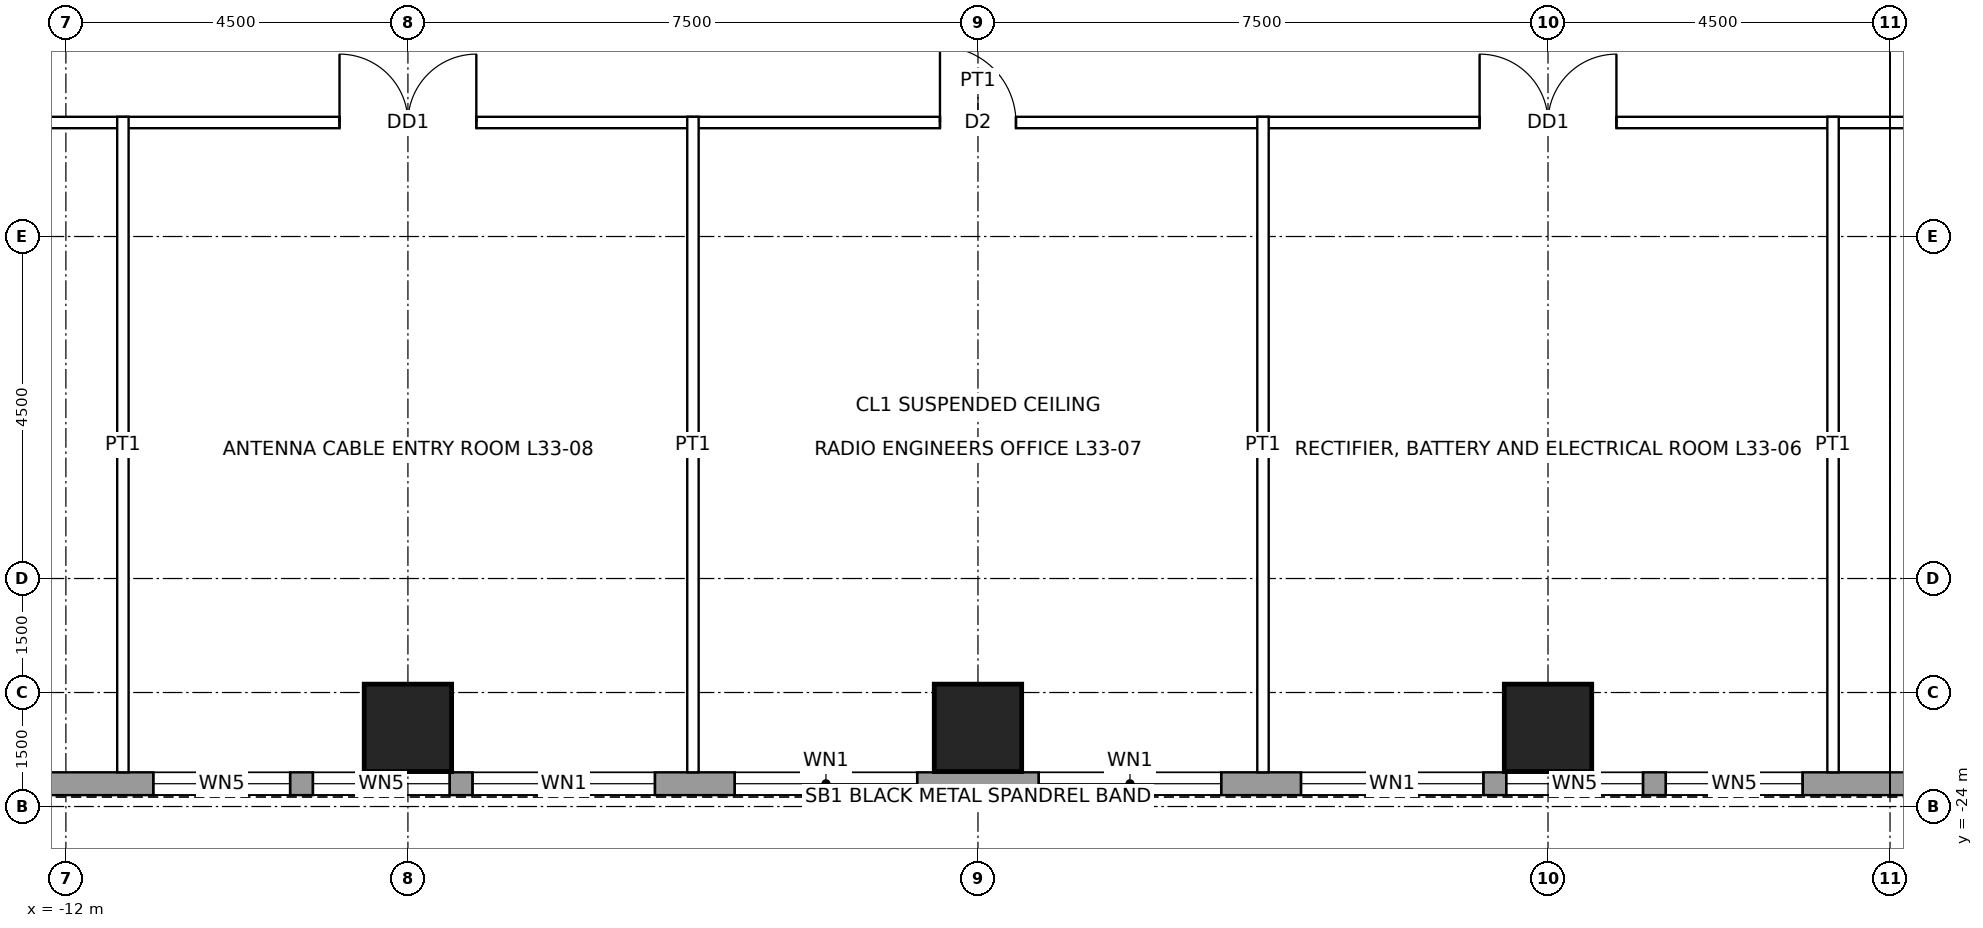
"""IFC4 building model, lengths in metres.
Left out: names, types, materials, properties, quantities, classifications, styles, units other than length and angle.
Written with IfcOpenShell. Run it as: python <this file> out.ifc"""

import sys

from ifc_helpers import new_model, si_unit, direction, frame, frame_2d, origin, origin_2d, place, context, subcontext, project, spatial, rectangle, hollow_rectangle, extrude, element, fill, save


model = new_model("IFC4")
c1 = context("Model", 3, precision=1e-05, world=origin(), true_north=direction((0.0, 1.0)))
c2 = subcontext(c1, "Body", "Model", "MODEL_VIEW")
j1 = project(units=[si_unit("LENGTHUNIT", "METRE"), si_unit("PLANEANGLEUNIT", "RADIAN")], contexts=[c1])
p1 = place(None, origin())
s1 = spatial("IfcSite", under=j1, at=p1, CompositionType="ELEMENT")
p2 = place(p1, origin())
s2 = spatial("IfcBuilding", under=s1, at=p2, CompositionType="ELEMENT")
p3 = place(p2, frame((0.0, 0.0, 162.9)))
s3 = spatial("IfcBuildingStorey", under=s2, at=p3, CompositionType="ELEMENT", Elevation=162.9)
for number, where, z_axis, x_axis in (
    (1, (7.5, -22.965, 0.0), (0.0, 0.0, 1.0), (1.0, 0.0, 0.0)),
    (2, (0.0, -22.965, 0.0), (0.0, 0.0, 1.0), (1.0, 0.0, 0.0)),
    (3, (-7.5, -22.965, 0.0), (0.0, 0.0, 1.0), (1.0, 0.0, 0.0)),
):
    element("IfcColumn", number, at=place(p3, frame(where, z_axis=z_axis, x_axis=x_axis)), inside=s3, PredefinedType="COLUMN", context=c2, shape_type="SweptSolid", body=[
        extrude(hollow_rectangle(XDim=1.15, YDim=1.15, WallThickness=0.075, at=origin_2d()), origin(), (0.0, 0.0, 1.0), 4.5),
    ])
p4 = place(p3, frame((16.2, -23.7, 0.0), z_axis=(0.0, 0.0, 1.0), x_axis=(-1.0, 0.0, 0.0)))
e4 = element("IfcWall", 4, at=p4, inside=s3, PredefinedType="SOLIDWALL", context=c2, shape_type="SweptSolid", body=[
    extrude(rectangle(XDim=32.4, YDim=0.3, at=frame_2d((16.2, 0.0))), origin(), (0.0, 0.0, 1.0), 4.3),
])
p5 = place(p4, frame((5.35, 0.0, 1.0)))
e5 = element("IfcOpeningElement", 5, at=p5, cuts=e4, PredefinedType="OPENING", context=c2, shape_type="SweptSolid", body=[
    extrude(rectangle(XDim=1.8, YDim=1.2, at=frame_2d((0.9, 0.6))), frame((0.0, 0.16, 0.0), z_axis=(0.0, -1.0, 0.0), x_axis=(1.0, 0.0, 0.0)), (0.0, 0.0, 1.0), 0.32),
])
p6 = place(p4, frame((7.45, 0.0, 1.0)))
e6 = element("IfcOpeningElement", 6, at=p6, cuts=e4, PredefinedType="OPENING", context=c2, shape_type="SweptSolid", body=[
    extrude(rectangle(XDim=1.8, YDim=1.2, at=frame_2d((0.9, 0.6))), frame((0.0, 0.16, 0.0), z_axis=(0.0, -1.0, 0.0), x_axis=(1.0, 0.0, 0.0)), (0.0, 0.0, 1.0), 0.32),
])
p7 = place(p4, frame((9.55, 0.0, 1.0)))
e7 = element("IfcOpeningElement", 7, at=p7, cuts=e4, PredefinedType="OPENING", context=c2, shape_type="SweptSolid", body=[
    extrude(rectangle(XDim=2.4, YDim=1.2, at=frame_2d((1.2, 0.6))), frame((0.0, 0.16, 0.0), z_axis=(0.0, -1.0, 0.0), x_axis=(1.0, 0.0, 0.0)), (0.0, 0.0, 1.0), 0.32),
])
p8 = place(p4, frame((13.0, 0.0, 1.0)))
e8 = element("IfcOpeningElement", 8, at=p8, cuts=e4, PredefinedType="OPENING", context=c2, shape_type="SweptSolid", body=[
    extrude(rectangle(XDim=2.4, YDim=1.2, at=frame_2d((1.2, 0.6))), frame((0.0, 0.16, 0.0), z_axis=(0.0, -1.0, 0.0), x_axis=(1.0, 0.0, 0.0)), (0.0, 0.0, 1.0), 0.32),
])
p9 = place(p4, frame((17.0, 0.0, 1.0)))
e9 = element("IfcOpeningElement", 9, at=p9, cuts=e4, PredefinedType="OPENING", context=c2, shape_type="SweptSolid", body=[
    extrude(rectangle(XDim=2.4, YDim=1.2, at=frame_2d((1.2, 0.6))), frame((0.0, 0.16, 0.0), z_axis=(0.0, -1.0, 0.0), x_axis=(1.0, 0.0, 0.0)), (0.0, 0.0, 1.0), 0.32),
])
p10 = place(p4, frame((20.45, 0.0, 1.0)))
e10 = element("IfcOpeningElement", 10, at=p10, cuts=e4, PredefinedType="OPENING", context=c2, shape_type="SweptSolid", body=[
    extrude(rectangle(XDim=2.4, YDim=1.2, at=frame_2d((1.2, 0.6))), frame((0.0, 0.16, 0.0), z_axis=(0.0, -1.0, 0.0), x_axis=(1.0, 0.0, 0.0)), (0.0, 0.0, 1.0), 0.32),
])
p11 = place(p4, frame((23.15, 0.0, 1.0)))
e11 = element("IfcOpeningElement", 11, at=p11, cuts=e4, PredefinedType="OPENING", context=c2, shape_type="SweptSolid", body=[
    extrude(rectangle(XDim=1.8, YDim=1.2, at=frame_2d((0.9, 0.6))), frame((0.0, 0.16, 0.0), z_axis=(0.0, -1.0, 0.0), x_axis=(1.0, 0.0, 0.0)), (0.0, 0.0, 1.0), 0.32),
])
p12 = place(p4, frame((25.25, 0.0, 1.0)))
e12 = element("IfcOpeningElement", 12, at=p12, cuts=e4, PredefinedType="OPENING", context=c2, shape_type="SweptSolid", body=[
    extrude(rectangle(XDim=1.8, YDim=1.2, at=frame_2d((0.9, 0.6))), frame((0.0, 0.16, 0.0), z_axis=(0.0, -1.0, 0.0), x_axis=(1.0, 0.0, 0.0)), (0.0, 0.0, 1.0), 0.32),
])
p13 = place(p3, frame((-15.075, -15.0, 0.0), z_axis=(0.0, 0.0, 1.0), x_axis=(1.0, 0.0, 0.0)))
e13 = element("IfcWall", 13, at=p13, inside=s3, PredefinedType="PARTITIONING", context=c2, shape_type="SweptSolid", body=[
    extrude(rectangle(XDim=30.15, YDim=0.15, at=frame_2d((15.075, 0.0))), origin(), (0.0, 0.0, 1.0), 4.3),
])
p14 = place(p13, frame((21.675, 0.0, 0.0)))
e14 = element("IfcOpeningElement", 14, at=p14, cuts=e13, PredefinedType="OPENING", context=c2, shape_type="SweptSolid", body=[
    extrude(rectangle(XDim=1.8, YDim=2.4, at=frame_2d((0.9, 1.2))), frame((0.0, 0.085, 0.0), z_axis=(0.0, -1.0, 0.0), x_axis=(1.0, 0.0, 0.0)), (0.0, 0.0, 1.0), 0.17),
])
p15 = place(p13, frame((14.575, 0.0, 0.0)))
e15 = element("IfcOpeningElement", 15, at=p15, cuts=e13, PredefinedType="OPENING", context=c2, shape_type="SweptSolid", body=[
    extrude(rectangle(XDim=1.0, YDim=2.1, at=frame_2d((0.5, 1.05))), frame((0.0, 0.085, 0.0), z_axis=(0.0, -1.0, 0.0), x_axis=(1.0, 0.0, 0.0)), (0.0, 0.0, 1.0), 0.17),
])
p16 = place(p13, frame((6.675, 0.0, 0.0)))
e16 = element("IfcOpeningElement", 16, at=p16, cuts=e13, PredefinedType="OPENING", context=c2, shape_type="SweptSolid", body=[
    extrude(rectangle(XDim=1.8, YDim=2.4, at=frame_2d((0.9, 1.2))), frame((0.0, 0.085, 0.0), z_axis=(0.0, -1.0, 0.0), x_axis=(1.0, 0.0, 0.0)), (0.0, 0.0, 1.0), 0.17),
])
p17 = place(p13, frame((27.7, 0.0, 0.0)))
e17 = element("IfcOpeningElement", 17, at=p17, cuts=e13, PredefinedType="OPENING", context=c2, shape_type="SweptSolid", body=[
    extrude(rectangle(XDim=1.0, YDim=2.1, at=frame_2d((0.5, 1.05))), frame((0.0, 0.085, 0.0), z_axis=(0.0, -1.0, 0.0), x_axis=(1.0, 0.0, 0.0)), (0.0, 0.0, 1.0), 0.17),
])
p18 = place(p13, frame((1.45, 0.0, 0.0)))
e18 = element("IfcOpeningElement", 18, at=p18, cuts=e13, PredefinedType="OPENING", context=c2, shape_type="SweptSolid", body=[
    extrude(rectangle(XDim=1.0, YDim=2.1, at=frame_2d((0.5, 1.05))), frame((0.0, 0.085, 0.0), z_axis=(0.0, -1.0, 0.0), x_axis=(1.0, 0.0, 0.0)), (0.0, 0.0, 1.0), 0.17),
])
for number, where, z_axis, x_axis in (
    (19, (-11.25, -23.55, 0.0), (0.0, 0.0, 1.0), (0.0, 1.0, 0.0)),
    (20, (-3.75, -23.55, 0.0), (0.0, 0.0, 1.0), (0.0, 1.0, 0.0)),
    (21, (3.75, -23.55, 0.0), (0.0, 0.0, 1.0), (0.0, 1.0, 0.0)),
    (22, (11.25, -23.55, 0.0), (0.0, 0.0, 1.0), (0.0, 1.0, 0.0)),
):
    element("IfcWall", number, at=place(p3, frame(where, z_axis=z_axis, x_axis=x_axis)), inside=s3, PredefinedType="PARTITIONING", context=c2, shape_type="SweptSolid", body=[
        extrude(rectangle(XDim=8.625, YDim=0.15, at=frame_2d((4.312, 0.0))), origin(), (0.0, 0.0, 1.0), 3.431),
    ])
p19 = place(p5, origin())
e23 = element("IfcWindow", 23, at=p19, inside=s3, PartitioningType="SINGLE_PANEL", PredefinedType="WINDOW", context=c2, shape_type="SweptSolid", body=[
    extrude(rectangle(XDim=1.8, YDim=1.2, at=frame_2d((0.9, 0.6))), frame((0.0, 0.03, 0.0), z_axis=(0.0, -1.0, 0.0), x_axis=(1.0, 0.0, 0.0)), (0.0, 0.0, 1.0), 0.06),
])
fill(e5, e23)
p20 = place(p6, origin())
e24 = element("IfcWindow", 24, at=p20, inside=s3, PartitioningType="SINGLE_PANEL", PredefinedType="WINDOW", context=c2, shape_type="SweptSolid", body=[
    extrude(rectangle(XDim=1.8, YDim=1.2, at=frame_2d((0.9, 0.6))), frame((0.0, 0.03, 0.0), z_axis=(0.0, -1.0, 0.0), x_axis=(1.0, 0.0, 0.0)), (0.0, 0.0, 1.0), 0.06),
])
fill(e6, e24)
p21 = place(p7, origin())
e25 = element("IfcWindow", 25, at=p21, inside=s3, PartitioningType="SINGLE_PANEL", PredefinedType="WINDOW", context=c2, shape_type="SweptSolid", body=[
    extrude(rectangle(XDim=2.4, YDim=1.2, at=frame_2d((1.2, 0.6))), frame((0.0, 0.03, 0.0), z_axis=(0.0, -1.0, 0.0), x_axis=(1.0, 0.0, 0.0)), (0.0, 0.0, 1.0), 0.06),
])
fill(e7, e25)
p22 = place(p8, origin())
e26 = element("IfcWindow", 26, at=p22, inside=s3, PartitioningType="SINGLE_PANEL", PredefinedType="WINDOW", context=c2, shape_type="SweptSolid", body=[
    extrude(rectangle(XDim=2.4, YDim=1.2, at=frame_2d((1.2, 0.6))), frame((0.0, 0.03, 0.0), z_axis=(0.0, -1.0, 0.0), x_axis=(1.0, 0.0, 0.0)), (0.0, 0.0, 1.0), 0.06),
])
fill(e8, e26)
p23 = place(p9, origin())
e27 = element("IfcWindow", 27, at=p23, inside=s3, PartitioningType="SINGLE_PANEL", PredefinedType="WINDOW", context=c2, shape_type="SweptSolid", body=[
    extrude(rectangle(XDim=2.4, YDim=1.2, at=frame_2d((1.2, 0.6))), frame((0.0, 0.03, 0.0), z_axis=(0.0, -1.0, 0.0), x_axis=(1.0, 0.0, 0.0)), (0.0, 0.0, 1.0), 0.06),
])
fill(e9, e27)
p24 = place(p10, origin())
e28 = element("IfcWindow", 28, at=p24, inside=s3, PartitioningType="SINGLE_PANEL", PredefinedType="WINDOW", context=c2, shape_type="SweptSolid", body=[
    extrude(rectangle(XDim=2.4, YDim=1.2, at=frame_2d((1.2, 0.6))), frame((0.0, 0.03, 0.0), z_axis=(0.0, -1.0, 0.0), x_axis=(1.0, 0.0, 0.0)), (0.0, 0.0, 1.0), 0.06),
])
fill(e10, e28)
p25 = place(p11, origin())
e29 = element("IfcWindow", 29, at=p25, inside=s3, PartitioningType="SINGLE_PANEL", PredefinedType="WINDOW", context=c2, shape_type="SweptSolid", body=[
    extrude(rectangle(XDim=1.8, YDim=1.2, at=frame_2d((0.9, 0.6))), frame((0.0, 0.03, 0.0), z_axis=(0.0, -1.0, 0.0), x_axis=(1.0, 0.0, 0.0)), (0.0, 0.0, 1.0), 0.06),
])
fill(e11, e29)
p26 = place(p12, origin())
e30 = element("IfcWindow", 30, at=p26, inside=s3, PartitioningType="SINGLE_PANEL", PredefinedType="WINDOW", context=c2, shape_type="SweptSolid", body=[
    extrude(rectangle(XDim=1.8, YDim=1.2, at=frame_2d((0.9, 0.6))), frame((0.0, 0.03, 0.0), z_axis=(0.0, -1.0, 0.0), x_axis=(1.0, 0.0, 0.0)), (0.0, 0.0, 1.0), 0.06),
])
fill(e12, e30)
p27 = place(p14, origin())
e31 = element("IfcDoor", 31, at=p27, inside=s3, OperationType="DOUBLE_DOOR_SINGLE_SWING", PredefinedType="DOOR", context=c2, shape_type="SweptSolid", body=[
    extrude(rectangle(XDim=1.8, YDim=2.4, at=frame_2d((0.9, 1.2))), frame((0.0, 0.025, 0.0), z_axis=(0.0, -1.0, 0.0), x_axis=(1.0, 0.0, 0.0)), (0.0, 0.0, 1.0), 0.05),
])
fill(e14, e31)
p28 = place(p15, origin())
e32 = element("IfcDoor", 32, at=p28, inside=s3, OperationType="SINGLE_SWING_LEFT", PredefinedType="DOOR", context=c2, shape_type="SweptSolid", body=[
    extrude(rectangle(XDim=1.0, YDim=2.1, at=frame_2d((0.5, 1.05))), frame((0.0, 0.025, 0.0), z_axis=(0.0, -1.0, 0.0), x_axis=(1.0, 0.0, 0.0)), (0.0, 0.0, 1.0), 0.05),
])
fill(e15, e32)
p29 = place(p16, origin())
e33 = element("IfcDoor", 33, at=p29, inside=s3, OperationType="DOUBLE_DOOR_SINGLE_SWING", PredefinedType="DOOR", context=c2, shape_type="SweptSolid", body=[
    extrude(rectangle(XDim=1.8, YDim=2.4, at=frame_2d((0.9, 1.2))), frame((0.0, 0.025, 0.0), z_axis=(0.0, -1.0, 0.0), x_axis=(1.0, 0.0, 0.0)), (0.0, 0.0, 1.0), 0.05),
])
fill(e16, e33)
save(model, sys.argv[1])
